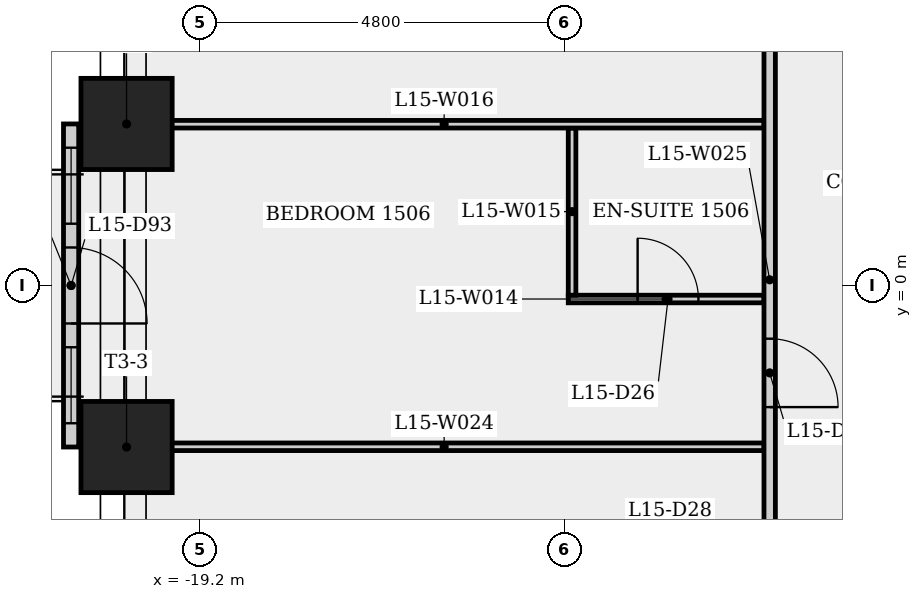
"""IFC4 building model, lengths in metres.
Left out: names, types, materials, properties, quantities, classifications, styles, units other than length and angle.
Written with IfcOpenShell. Run it as: python <this file> out.ifc"""

import sys

from ifc_helpers import new_model, si_unit, direction, frame, frame_2d, origin, origin_2d, place, context, subcontext, project, spatial, rectangle, extrude, element, fill, save


model = new_model("IFC4")
c1 = context("Model", 3, precision=1e-05, world=origin(), true_north=direction((0.0, 1.0)))
c2 = subcontext(c1, "Body", "Model", "MODEL_VIEW")
j1 = project(units=[si_unit("LENGTHUNIT", "METRE"), si_unit("PLANEANGLEUNIT", "RADIAN")], contexts=[c1])
p1 = place(None, origin())
s1 = spatial("IfcSite", under=j1, at=p1, CompositionType="ELEMENT")
p2 = place(p1, origin())
s2 = spatial("IfcBuilding", under=s1, at=p2, CompositionType="ELEMENT")
p3 = place(p2, frame((0.0, 0.0, 59.5)))
s3 = spatial("IfcBuildingStorey", under=s2, at=p3, CompositionType="ELEMENT", Elevation=59.5)
for number, where, z_axis, x_axis in (
    (1, (-20.161, 2.125, 0.0), (0.0, 0.0, 1.0), (-1.0, 0.0, 0.0)),
    (2, (-20.161, -2.125, 0.0), (0.0, 0.0, 1.0), (-1.0, 0.0, 0.0)),
):
    element("IfcColumn", number, at=place(p3, frame(where, z_axis=z_axis, x_axis=x_axis)), inside=s3, PredefinedType="COLUMN", context=c2, shape_type="SweptSolid", body=[
        extrude(rectangle(XDim=1.2, YDim=1.2, at=origin_2d()), origin(), (0.0, 0.0, 1.0), 3.4),
    ])
p4 = place(p3, frame((-20.891, 2.126, 0.0), z_axis=(0.0, 0.0, 1.0), x_axis=(0.0, -1.0, 0.0)))
e3 = element("IfcWall", 3, at=p4, inside=s3, PredefinedType="SOLIDWALL", context=c2, shape_type="SweptSolid", body=[
    extrude(rectangle(XDim=4.251, YDim=0.2, at=frame_2d((2.125, 0.0))), origin(), (0.0, 0.0, 1.0), 3.4),
])
p5 = place(p4, frame((1.625, 0.0, 0.0)))
e4 = element("IfcOpeningElement", 4, at=p5, cuts=e3, PredefinedType="OPENING", context=c2, shape_type="SweptSolid", body=[
    extrude(rectangle(XDim=1.0, YDim=2.4, at=frame_2d((0.5, 1.2))), frame((0.0, 0.11, 0.0), z_axis=(0.0, -1.0, 0.0), x_axis=(1.0, 0.0, 0.0)), (0.0, 0.0, 1.0), 0.22),
])
p6 = place(p4, frame((0.313, 0.0, 0.9)))
e5 = element("IfcOpeningElement", 5, at=p6, cuts=e3, PredefinedType="OPENING", context=c2, shape_type="SweptSolid", body=[
    extrude(rectangle(XDim=1.0, YDim=1.5, at=frame_2d((0.5, 0.75))), frame((0.0, 0.11, 0.0), z_axis=(0.0, -1.0, 0.0), x_axis=(1.0, 0.0, 0.0)), (0.0, 0.0, 1.0), 0.22),
])
p7 = place(p4, frame((2.938, 0.0, 0.9)))
e6 = element("IfcOpeningElement", 6, at=p7, cuts=e3, PredefinedType="OPENING", context=c2, shape_type="SweptSolid", body=[
    extrude(rectangle(XDim=1.0, YDim=1.5, at=frame_2d((0.5, 0.75))), frame((0.0, 0.11, 0.0), z_axis=(0.0, -1.0, 0.0), x_axis=(1.0, 0.0, 0.0)), (0.0, 0.0, 1.0), 0.22),
])
p8 = place(p3, frame((-14.35, -0.178, 0.0), z_axis=(0.0, 0.0, 1.0), x_axis=(1.0, 0.0, 0.0)))
e7 = element("IfcWall", 7, at=p8, inside=s3, PredefinedType="PARTITIONING", context=c2, shape_type="SweptSolid", body=[
    extrude(rectangle(XDim=2.575, YDim=0.1, at=frame_2d((1.288, 0.0))), origin(), (0.0, 0.0, 1.0), 3.05),
])
p9 = place(p8, frame((0.913, 0.0, 0.0)))
e8 = element("IfcOpeningElement", 8, at=p9, cuts=e7, PredefinedType="OPENING", context=c2, shape_type="SweptSolid", body=[
    extrude(rectangle(XDim=0.8, YDim=2.1, at=frame_2d((0.4, 1.05))), frame((0.0, 0.06, 0.0), z_axis=(0.0, -1.0, 0.0), x_axis=(1.0, 0.0, 0.0)), (0.0, 0.0, 1.0), 0.12),
])
p10 = place(p3, frame((-14.3, 2.072, 0.0), z_axis=(0.0, 0.0, 1.0), x_axis=(0.0, -1.0, 0.0)))
e9 = element("IfcWall", 9, at=p10, inside=s3, PredefinedType="PARTITIONING", context=c2, shape_type="SweptSolid", body=[
    extrude(rectangle(XDim=2.2, YDim=0.1, at=frame_2d((1.1, 0.0))), origin(), (0.0, 0.0, 1.0), 3.05),
])
for number, where, z_axis, x_axis in (
    (10, (-20.191, 2.122, 0.0), (0.0, 0.0, 1.0), (1.0, 0.0, 0.0)),
    (11, (-11.775, -2.122, 0.0), (0.0, 0.0, 1.0), (-1.0, 0.0, 0.0)),
):
    element("IfcWall", number, at=place(p3, frame(where, z_axis=z_axis, x_axis=x_axis)), inside=s3, PredefinedType="PARTITIONING", context=c2, shape_type="SweptSolid", body=[
        extrude(rectangle(XDim=8.416, YDim=0.1, at=frame_2d((4.208, 0.0))), origin(), (0.0, 0.0, 1.0), 3.05),
    ])
p11 = place(p3, frame((-11.7, 6.137, 0.0), z_axis=(0.0, 0.0, 1.0), x_axis=(0.0, -1.0, 0.0)))
e12 = element("IfcWall", 12, at=p11, inside=s3, PredefinedType="PARTITIONING", context=c2, shape_type="SweptSolid", body=[
    extrude(rectangle(XDim=12.125, YDim=0.15, at=frame_2d((6.062, 0.0))), origin(), (0.0, 0.0, 1.0), 3.05),
])
p12 = place(p11, frame((6.837, 0.0, 0.0)))
e13 = element("IfcOpeningElement", 13, at=p12, cuts=e12, PredefinedType="OPENING", context=c2, shape_type="SweptSolid", body=[
    extrude(rectangle(XDim=0.9, YDim=2.1, at=frame_2d((0.45, 1.05))), frame((0.0, 0.085, 0.0), z_axis=(0.0, -1.0, 0.0), x_axis=(1.0, 0.0, 0.0)), (0.0, 0.0, 1.0), 0.17),
])
p13 = place(p5, origin())
e14 = element("IfcDoor", 14, at=p13, inside=s3, OperationType="SINGLE_SWING_RIGHT", PredefinedType="DOOR", context=c2, shape_type="SweptSolid", body=[
    extrude(rectangle(XDim=1.0, YDim=2.4, at=frame_2d((0.5, 1.2))), frame((0.0, 0.025, 0.0), z_axis=(0.0, -1.0, 0.0), x_axis=(1.0, 0.0, 0.0)), (0.0, 0.0, 1.0), 0.05),
])
fill(e4, e14)
p14 = place(p6, origin())
e15 = element("IfcWindow", 15, at=p14, inside=s3, PartitioningType="SINGLE_PANEL", PredefinedType="WINDOW", context=c2, shape_type="SweptSolid", body=[
    extrude(rectangle(XDim=1.0, YDim=1.5, at=frame_2d((0.5, 0.75))), frame((0.0, 0.03, 0.0), z_axis=(0.0, -1.0, 0.0), x_axis=(1.0, 0.0, 0.0)), (0.0, 0.0, 1.0), 0.06),
])
fill(e5, e15)
p15 = place(p7, origin())
e16 = element("IfcWindow", 16, at=p15, inside=s3, PartitioningType="SINGLE_PANEL", PredefinedType="WINDOW", context=c2, shape_type="SweptSolid", body=[
    extrude(rectangle(XDim=1.0, YDim=1.5, at=frame_2d((0.5, 0.75))), frame((0.0, 0.03, 0.0), z_axis=(0.0, -1.0, 0.0), x_axis=(1.0, 0.0, 0.0)), (0.0, 0.0, 1.0), 0.06),
])
fill(e6, e16)
p16 = place(p12, origin())
e17 = element("IfcDoor", 17, at=p16, inside=s3, OperationType="SINGLE_SWING_RIGHT", PredefinedType="DOOR", context=c2, shape_type="SweptSolid", body=[
    extrude(rectangle(XDim=0.9, YDim=2.1, at=frame_2d((0.45, 1.05))), frame((0.0, 0.025, 0.0), z_axis=(0.0, -1.0, 0.0), x_axis=(1.0, 0.0, 0.0)), (0.0, 0.0, 1.0), 0.05),
])
fill(e13, e17)
p17 = place(p9, origin())
e18 = element("IfcDoor", 18, at=p17, inside=s3, OperationType="SINGLE_SWING_LEFT", PredefinedType="DOOR", context=c2, shape_type="SweptSolid", body=[
    extrude(rectangle(XDim=0.8, YDim=2.1, at=frame_2d((0.4, 1.05))), frame((0.0, 0.025, 0.0), z_axis=(0.0, -1.0, 0.0), x_axis=(1.0, 0.0, 0.0)), (0.0, 0.0, 1.0), 0.05),
])
fill(e8, e18)
save(model, sys.argv[1])
